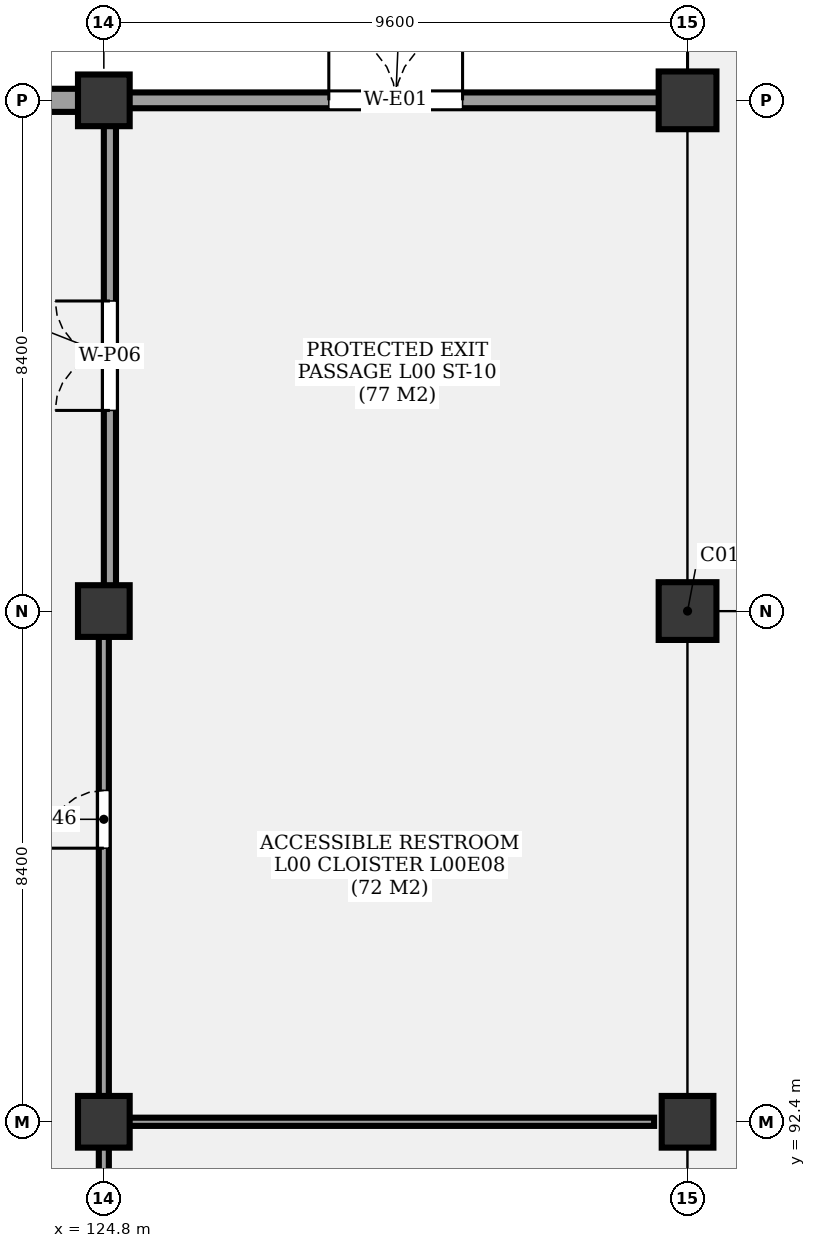
"""IFC4 building model, lengths in metres.
Left out: names, types, materials, properties, quantities, classifications, styles, units other than length and angle.
Written with IfcOpenShell. Run it as: python <this file> out.ifc"""

import sys

from ifc_helpers import new_model, si_unit, direction, frame, frame_2d, origin, origin_2d, place, context, subcontext, project, spatial, rectangle, extrude, element, fill, save


model = new_model("IFC4")
c1 = context("Model", 3, precision=1e-05, world=origin(), true_north=direction((0.0, 1.0)))
c2 = subcontext(c1, "Body", "Model", "MODEL_VIEW")
j1 = project(units=[si_unit("LENGTHUNIT", "METRE"), si_unit("PLANEANGLEUNIT", "RADIAN")], contexts=[c1])
p1 = place(None, origin())
s1 = spatial("IfcSite", under=j1, at=p1, CompositionType="ELEMENT")
p2 = place(p1, origin())
s2 = spatial("IfcBuilding", under=s1, at=p2, CompositionType="ELEMENT")
p3 = place(p2, origin())
s3 = spatial("IfcBuildingStorey", under=s2, at=p3, CompositionType="ELEMENT", Elevation=0.0)
for number, where, z_axis, x_axis in (
    (1, (124.8, 92.4, -0.35), (0.0, 0.0, 1.0), (1.0, 0.0, 0.0)),
    (2, (124.8, 100.8, -0.35), (0.0, 0.0, 1.0), (1.0, 0.0, 0.0)),
    (3, (124.8, 109.2, -0.35), (0.0, 0.0, 1.0), (1.0, 0.0, 0.0)),
    (4, (134.4, 92.4, -0.35), (0.0, 0.0, 1.0), (1.0, 0.0, 0.0)),
):
    element("IfcColumn", number, at=place(p3, frame(where, z_axis=z_axis, x_axis=x_axis)), inside=s3, PredefinedType="COLUMN", context=c2, shape_type="SweptSolid", body=[
        extrude(rectangle(XDim=0.85, YDim=0.85, at=origin_2d()), origin(), (0.0, 0.0, 1.0), 5.45),
    ])
for number, where, z_axis, x_axis in (
    (5, (134.4, 100.8, -0.35), (0.0, 0.0, 1.0), (1.0, 0.0, 0.0)),
    (6, (134.4, 109.2, -0.35), (0.0, 0.0, 1.0), (1.0, 0.0, 0.0)),
):
    element("IfcColumn", number, at=place(p3, frame(where, z_axis=z_axis, x_axis=x_axis)), inside=s3, PredefinedType="COLUMN", context=c2, shape_type="SweptSolid", body=[
        extrude(rectangle(XDim=0.95, YDim=0.95, at=origin_2d()), origin(), (0.0, 0.0, 1.0), 5.45),
    ])
p4 = place(p3, frame((115.2, 109.2, 0.0), z_axis=(0.0, 0.0, 1.0), x_axis=(1.0, 0.0, 0.0)))
e7 = element("IfcWall", 7, at=p4, inside=s3, PredefinedType="SOLIDWALL", context=c2, shape_type="SweptSolid", body=[
    extrude(rectangle(XDim=9.6, YDim=0.38, at=frame_2d((4.8, 0.0))), origin(), (0.0, 0.0, 1.0), 4.24),
])
p5 = place(p4, frame((3.1, 0.0, 0.85)))
e8 = element("IfcOpeningElement", 8, at=p5, cuts=e7, PredefinedType="OPENING", context=c2, shape_type="SweptSolid", body=[
    extrude(rectangle(XDim=3.4, YDim=1.4, at=frame_2d((1.7, 0.7))), frame((0.0, 0.2, 0.0), z_axis=(0.0, -1.0, 0.0), x_axis=(1.0, 0.0, 0.0)), (0.0, 0.0, 1.0), 0.4),
])
p6 = place(p3, frame((124.8, 109.2, 0.0), z_axis=(0.0, 0.0, 1.0), x_axis=(1.0, 0.0, 0.0)))
e9 = element("IfcWall", 9, at=p6, inside=s3, PredefinedType="SOLIDWALL", context=c2, shape_type="SweptSolid", body=[
    extrude(rectangle(XDim=9.6, YDim=0.26, at=frame_2d((4.8, 0.0))), origin(), (0.0, 0.0, 1.0), 4.24),
])
p7 = place(p6, frame((3.7, 0.0, 0.0)))
e10 = element("IfcOpeningElement", 10, at=p7, cuts=e9, PredefinedType="OPENING", context=c2, shape_type="SweptSolid", body=[
    extrude(rectangle(XDim=2.2, YDim=2.5, at=frame_2d((1.1, 1.25))), frame((0.0, 0.14, 0.0), z_axis=(0.0, -1.0, 0.0), x_axis=(1.0, 0.0, 0.0)), (0.0, 0.0, 1.0), 0.28),
])
p8 = place(p3, frame((124.8, 84.25, 0.0), z_axis=(0.0, 0.0, 1.0), x_axis=(0.0, 1.0, 0.0)))
e11 = element("IfcWall", 11, at=p8, inside=s3, PredefinedType="PARTITIONING", context=c2, shape_type="SweptSolid", body=[
    extrude(rectangle(XDim=7.9, YDim=0.165, at=frame_2d((3.95, 0.0))), origin(), (0.0, 0.0, 1.0), 3.98),
])
p9 = place(p8, frame((4.25, 0.0, 0.0)))
e12 = element("IfcOpeningElement", 12, at=p9, cuts=e11, PredefinedType="OPENING", context=c2, shape_type="SweptSolid", body=[
    extrude(rectangle(XDim=1.0, YDim=2.2, at=frame_2d((0.5, 1.1))), frame((0.0, 0.093, 0.0), z_axis=(0.0, -1.0, 0.0), x_axis=(1.0, 0.0, 0.0)), (0.0, 0.0, 1.0), 0.185),
])
p10 = place(p3, frame((124.8, 92.65, 0.0), z_axis=(0.0, 0.0, 1.0), x_axis=(0.0, 1.0, 0.0)))
e13 = element("IfcWall", 13, at=p10, inside=s3, PredefinedType="PARTITIONING", context=c2, shape_type="SweptSolid", body=[
    extrude(rectangle(XDim=7.9, YDim=0.165, at=frame_2d((3.95, 0.0))), origin(), (0.0, 0.0, 1.0), 3.98),
])
p11 = place(p10, frame((4.25, 0.0, 0.0)))
e14 = element("IfcOpeningElement", 14, at=p11, cuts=e13, PredefinedType="OPENING", context=c2, shape_type="SweptSolid", body=[
    extrude(rectangle(XDim=0.95, YDim=2.1, at=frame_2d((0.475, 1.05))), frame((0.0, 0.093, 0.0), z_axis=(0.0, -1.0, 0.0), x_axis=(1.0, 0.0, 0.0)), (0.0, 0.0, 1.0), 0.185),
])
p12 = place(p3, frame((124.95, 92.4, 0.0), z_axis=(0.0, 0.0, 1.0), x_axis=(1.0, 0.0, 0.0)))
e15 = element("IfcWall", 15, at=p12, inside=s3, PredefinedType="PARTITIONING", context=c2, shape_type="SweptSolid", body=[
    extrude(rectangle(XDim=8.9, YDim=0.135, at=frame_2d((4.45, 0.0))), origin(), (0.0, 0.0, 1.0), 3.98),
])
p13 = place(p3, frame((124.9, 101.2, 0.0), z_axis=(0.0, 0.0, 1.0), x_axis=(0.0, 1.0, 0.0)))
e16 = element("IfcWall", 16, at=p13, inside=s3, PredefinedType="PARTITIONING", context=c2, shape_type="SweptSolid", body=[
    extrude(rectangle(XDim=7.6, YDim=0.2, at=frame_2d((3.8, 0.0))), origin(), (0.0, 0.0, 1.0), 3.98),
])
p14 = place(p13, frame((2.9, 0.0, 0.0)))
e17 = element("IfcOpeningElement", 17, at=p14, cuts=e16, PredefinedType="OPENING", context=c2, shape_type="SweptSolid", body=[
    extrude(rectangle(XDim=1.8, YDim=2.2, at=frame_2d((0.9, 1.1))), frame((0.0, 0.11, 0.0), z_axis=(0.0, -1.0, 0.0), x_axis=(1.0, 0.0, 0.0)), (0.0, 0.0, 1.0), 0.22),
])
p15 = place(p7, origin())
e18 = element("IfcDoor", 18, at=p15, inside=s3, OperationType="DOUBLE_DOOR_SINGLE_SWING", PredefinedType="DOOR", context=c2, shape_type="SweptSolid", body=[
    extrude(rectangle(XDim=2.2, YDim=2.5, at=frame_2d((1.1, 1.25))), frame((0.0, 0.025, 0.0), z_axis=(0.0, -1.0, 0.0), x_axis=(1.0, 0.0, 0.0)), (0.0, 0.0, 1.0), 0.05),
])
fill(e10, e18)
p16 = place(p11, origin())
e19 = element("IfcDoor", 19, at=p16, inside=s3, OperationType="SINGLE_SWING_LEFT", PredefinedType="DOOR", context=c2, shape_type="SweptSolid", body=[
    extrude(rectangle(XDim=0.95, YDim=2.1, at=frame_2d((0.475, 1.05))), frame((0.0, 0.025, 0.0), z_axis=(0.0, -1.0, 0.0), x_axis=(1.0, 0.0, 0.0)), (0.0, 0.0, 1.0), 0.05),
])
fill(e14, e19)
p17 = place(p14, origin())
e20 = element("IfcDoor", 20, at=p17, inside=s3, OperationType="DOUBLE_DOOR_SINGLE_SWING", PredefinedType="DOOR", context=c2, shape_type="SweptSolid", body=[
    extrude(rectangle(XDim=1.8, YDim=2.2, at=frame_2d((0.9, 1.1))), frame((0.0, 0.025, 0.0), z_axis=(0.0, -1.0, 0.0), x_axis=(1.0, 0.0, 0.0)), (0.0, 0.0, 1.0), 0.05),
])
fill(e17, e20)
save(model, sys.argv[1])
